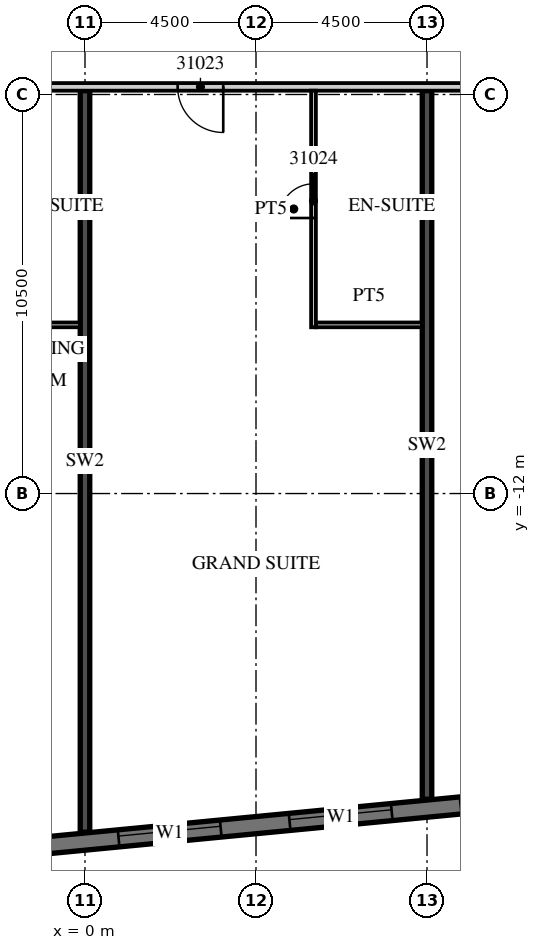
"""IFC4 building model, lengths in metres.
Left out: names, types, materials, properties, quantities, classifications, styles, units other than length and angle.
Written with IfcOpenShell. Run it as: python <this file> out.ifc"""

import sys

from ifc_helpers import new_model, si_unit, direction, frame, frame_2d, origin, place, context, subcontext, project, spatial, rectangle, extrude, element, fill, save


model = new_model("IFC4")
c1 = context("Model", 3, precision=1e-05, world=origin(), true_north=direction((0.0, 1.0)))
c2 = subcontext(c1, "Body", "Model", "MODEL_VIEW")
j1 = project(units=[si_unit("LENGTHUNIT", "METRE"), si_unit("PLANEANGLEUNIT", "RADIAN")], contexts=[c1])
p1 = place(None, origin())
s1 = spatial("IfcSite", under=j1, at=p1, CompositionType="ELEMENT")
p2 = place(p1, origin())
s2 = spatial("IfcBuilding", under=s1, at=p2, CompositionType="ELEMENT")
p3 = place(p2, frame((0.0, 0.0, 137.2)))
s3 = spatial("IfcBuildingStorey", under=s2, at=p3, CompositionType="ELEMENT", Elevation=137.2)
p4 = place(p3, frame((0.0, -20.91, 0.0), z_axis=(0.0, 0.0, 1.0), x_axis=(0.0, 1.0, 0.0)))
e1 = element("IfcWall", 1, at=p4, inside=s3, PredefinedType="SHEAR", context=c2, shape_type="SweptSolid", body=[
    extrude(rectangle(XDim=19.51, YDim=0.25, at=frame_2d((9.755, 0.0))), origin(), (0.0, 0.0, 1.0), 3.3),
])
p5 = place(p3, frame((9.0, -20.044, 0.0), z_axis=(0.0, 0.0, 1.0), x_axis=(0.0, 1.0, 0.0)))
e2 = element("IfcWall", 2, at=p5, inside=s3, PredefinedType="SHEAR", context=c2, shape_type="SweptSolid", body=[
    extrude(rectangle(XDim=18.644, YDim=0.25, at=frame_2d((9.322, 0.0))), origin(), (0.0, 0.0, 1.0), 3.3),
])
p6 = place(p3, frame((-13.521, -22.46, 0.0), z_axis=(0.0, 0.0, 1.0), x_axis=(0.995396096335, 0.095846812164, 0.0)))
e3 = element("IfcWall", 3, at=p6, inside=s3, PredefinedType="SOLIDWALL", context=c2, shape_type="SweptSolid", body=[
    extrude(rectangle(XDim=59.151, YDim=0.45, at=frame_2d((29.575, 0.0))), origin(), (0.0, 0.0, 1.0), 3.02),
])
p7 = place(p6, frame((0.91, 0.0, 0.45)))
e4 = element("IfcOpeningElement", 4, at=p7, cuts=e3, PredefinedType="OPENING", context=c2, shape_type="SweptSolid", body=[
    extrude(rectangle(XDim=2.7, YDim=2.25, at=frame_2d((1.35, 1.125))), frame((0.0, 0.235, 0.0), z_axis=(0.0, -1.0, 0.0), x_axis=(1.0, 0.0, 0.0)), (0.0, 0.0, 1.0), 0.47),
])
p8 = place(p6, frame((5.431, 0.0, 0.45)))
e5 = element("IfcOpeningElement", 5, at=p8, cuts=e3, PredefinedType="OPENING", context=c2, shape_type="SweptSolid", body=[
    extrude(rectangle(XDim=2.7, YDim=2.25, at=frame_2d((1.35, 1.125))), frame((0.0, 0.235, 0.0), z_axis=(0.0, -1.0, 0.0), x_axis=(1.0, 0.0, 0.0)), (0.0, 0.0, 1.0), 0.47),
])
p9 = place(p6, frame((9.952, 0.0, 0.45)))
e6 = element("IfcOpeningElement", 6, at=p9, cuts=e3, PredefinedType="OPENING", context=c2, shape_type="SweptSolid", body=[
    extrude(rectangle(XDim=2.7, YDim=2.25, at=frame_2d((1.35, 1.125))), frame((0.0, 0.235, 0.0), z_axis=(0.0, -1.0, 0.0), x_axis=(1.0, 0.0, 0.0)), (0.0, 0.0, 1.0), 0.47),
])
p10 = place(p6, frame((14.473, 0.0, 0.45)))
e7 = element("IfcOpeningElement", 7, at=p10, cuts=e3, PredefinedType="OPENING", context=c2, shape_type="SweptSolid", body=[
    extrude(rectangle(XDim=2.7, YDim=2.25, at=frame_2d((1.35, 1.125))), frame((0.0, 0.235, 0.0), z_axis=(0.0, -1.0, 0.0), x_axis=(1.0, 0.0, 0.0)), (0.0, 0.0, 1.0), 0.47),
])
p11 = place(p6, frame((18.994, 0.0, 0.45)))
e8 = element("IfcOpeningElement", 8, at=p11, cuts=e3, PredefinedType="OPENING", context=c2, shape_type="SweptSolid", body=[
    extrude(rectangle(XDim=2.7, YDim=2.25, at=frame_2d((1.35, 1.125))), frame((0.0, 0.235, 0.0), z_axis=(0.0, -1.0, 0.0), x_axis=(1.0, 0.0, 0.0)), (0.0, 0.0, 1.0), 0.47),
])
p12 = place(p6, frame((23.514, 0.0, 0.45)))
e9 = element("IfcOpeningElement", 9, at=p12, cuts=e3, PredefinedType="OPENING", context=c2, shape_type="SweptSolid", body=[
    extrude(rectangle(XDim=2.7, YDim=2.25, at=frame_2d((1.35, 1.125))), frame((0.0, 0.235, 0.0), z_axis=(0.0, -1.0, 0.0), x_axis=(1.0, 0.0, 0.0)), (0.0, 0.0, 1.0), 0.47),
])
p13 = place(p6, frame((28.035, 0.0, 0.45)))
e10 = element("IfcOpeningElement", 10, at=p13, cuts=e3, PredefinedType="OPENING", context=c2, shape_type="SweptSolid", body=[
    extrude(rectangle(XDim=2.7, YDim=2.25, at=frame_2d((1.35, 1.125))), frame((0.0, 0.235, 0.0), z_axis=(0.0, -1.0, 0.0), x_axis=(1.0, 0.0, 0.0)), (0.0, 0.0, 1.0), 0.47),
])
p14 = place(p6, frame((32.556, 0.0, 0.45)))
e11 = element("IfcOpeningElement", 11, at=p14, cuts=e3, PredefinedType="OPENING", context=c2, shape_type="SweptSolid", body=[
    extrude(rectangle(XDim=2.7, YDim=2.25, at=frame_2d((1.35, 1.125))), frame((0.0, 0.235, 0.0), z_axis=(0.0, -1.0, 0.0), x_axis=(1.0, 0.0, 0.0)), (0.0, 0.0, 1.0), 0.47),
])
p15 = place(p6, frame((37.077, 0.0, 0.45)))
e12 = element("IfcOpeningElement", 12, at=p15, cuts=e3, PredefinedType="OPENING", context=c2, shape_type="SweptSolid", body=[
    extrude(rectangle(XDim=2.7, YDim=2.25, at=frame_2d((1.35, 1.125))), frame((0.0, 0.235, 0.0), z_axis=(0.0, -1.0, 0.0), x_axis=(1.0, 0.0, 0.0)), (0.0, 0.0, 1.0), 0.47),
])
p16 = place(p6, frame((41.598, 0.0, 0.45)))
e13 = element("IfcOpeningElement", 13, at=p16, cuts=e3, PredefinedType="OPENING", context=c2, shape_type="SweptSolid", body=[
    extrude(rectangle(XDim=2.7, YDim=2.25, at=frame_2d((1.35, 1.125))), frame((0.0, 0.235, 0.0), z_axis=(0.0, -1.0, 0.0), x_axis=(1.0, 0.0, 0.0)), (0.0, 0.0, 1.0), 0.47),
])
p17 = place(p6, frame((46.118, 0.0, 0.45)))
e14 = element("IfcOpeningElement", 14, at=p17, cuts=e3, PredefinedType="OPENING", context=c2, shape_type="SweptSolid", body=[
    extrude(rectangle(XDim=2.7, YDim=2.25, at=frame_2d((1.35, 1.125))), frame((0.0, 0.235, 0.0), z_axis=(0.0, -1.0, 0.0), x_axis=(1.0, 0.0, 0.0)), (0.0, 0.0, 1.0), 0.47),
])
p18 = place(p6, frame((50.639, 0.0, 0.45)))
e15 = element("IfcOpeningElement", 15, at=p18, cuts=e3, PredefinedType="OPENING", context=c2, shape_type="SweptSolid", body=[
    extrude(rectangle(XDim=2.7, YDim=2.25, at=frame_2d((1.35, 1.125))), frame((0.0, 0.235, 0.0), z_axis=(0.0, -1.0, 0.0), x_axis=(1.0, 0.0, 0.0)), (0.0, 0.0, 1.0), 0.47),
])
p19 = place(p6, frame((55.15, 0.0, 0.45)))
e16 = element("IfcOpeningElement", 16, at=p19, cuts=e3, PredefinedType="OPENING", context=c2, shape_type="SweptSolid", body=[
    extrude(rectangle(XDim=2.7, YDim=2.25, at=frame_2d((1.35, 1.125))), frame((0.0, 0.235, 0.0), z_axis=(0.0, -1.0, 0.0), x_axis=(1.0, 0.0, 0.0)), (0.0, 0.0, 1.0), 0.47),
])
p20 = place(p3, frame((-13.5, -1.3, 0.0), z_axis=(0.0, 0.0, 1.0), x_axis=(1.0, 0.0, 0.0)))
e17 = element("IfcWall", 17, at=p20, inside=s3, PredefinedType="PARTITIONING", context=c2, shape_type="SweptSolid", body=[
    extrude(rectangle(XDim=60.932, YDim=0.2, at=frame_2d((30.466, 0.0))), origin(), (0.0, 0.0, 1.0), 3.02),
])
p21 = place(p20, frame((2.925, 0.0, 0.0)))
e18 = element("IfcOpeningElement", 18, at=p21, cuts=e17, PredefinedType="OPENING", context=c2, shape_type="SweptSolid", body=[
    extrude(rectangle(XDim=1.0, YDim=2.1, at=frame_2d((0.5, 1.05))), frame((0.0, 0.11, 0.0), z_axis=(0.0, -1.0, 0.0), x_axis=(1.0, 0.0, 0.0)), (0.0, 0.0, 1.0), 0.22),
])
p22 = place(p20, frame((7.45, 0.0, 0.0)))
e19 = element("IfcOpeningElement", 19, at=p22, cuts=e17, PredefinedType="OPENING", context=c2, shape_type="SweptSolid", body=[
    extrude(rectangle(XDim=1.0, YDim=2.1, at=frame_2d((0.5, 1.05))), frame((0.0, 0.11, 0.0), z_axis=(0.0, -1.0, 0.0), x_axis=(1.0, 0.0, 0.0)), (0.0, 0.0, 1.0), 0.22),
])
p23 = place(p20, frame((9.55, 0.0, 0.0)))
e20 = element("IfcOpeningElement", 20, at=p23, cuts=e17, PredefinedType="OPENING", context=c2, shape_type="SweptSolid", body=[
    extrude(rectangle(XDim=1.0, YDim=2.1, at=frame_2d((0.5, 1.05))), frame((0.0, 0.11, 0.0), z_axis=(0.0, -1.0, 0.0), x_axis=(1.0, 0.0, 0.0)), (0.0, 0.0, 1.0), 0.22),
])
p24 = place(p20, frame((15.938, 0.0, 0.0)))
e21 = element("IfcOpeningElement", 21, at=p24, cuts=e17, PredefinedType="OPENING", context=c2, shape_type="SweptSolid", body=[
    extrude(rectangle(XDim=1.2, YDim=2.1, at=frame_2d((0.6, 1.05))), frame((0.0, 0.11, 0.0), z_axis=(0.0, -1.0, 0.0), x_axis=(1.0, 0.0, 0.0)), (0.0, 0.0, 1.0), 0.22),
])
p25 = place(p20, frame((24.938, 0.0, 0.0)))
e22 = element("IfcOpeningElement", 22, at=p25, cuts=e17, PredefinedType="OPENING", context=c2, shape_type="SweptSolid", body=[
    extrude(rectangle(XDim=1.2, YDim=2.1, at=frame_2d((0.6, 1.05))), frame((0.0, 0.11, 0.0), z_axis=(0.0, -1.0, 0.0), x_axis=(1.0, 0.0, 0.0)), (0.0, 0.0, 1.0), 0.22),
])
p26 = place(p20, frame((32.075, 0.0, 0.0)))
e23 = element("IfcOpeningElement", 23, at=p26, cuts=e17, PredefinedType="OPENING", context=c2, shape_type="SweptSolid", body=[
    extrude(rectangle(XDim=1.0, YDim=2.1, at=frame_2d((0.5, 1.05))), frame((0.0, 0.11, 0.0), z_axis=(0.0, -1.0, 0.0), x_axis=(1.0, 0.0, 0.0)), (0.0, 0.0, 1.0), 0.22),
])
p27 = place(p20, frame((36.55, 0.0, 0.0)))
e24 = element("IfcOpeningElement", 24, at=p27, cuts=e17, PredefinedType="OPENING", context=c2, shape_type="SweptSolid", body=[
    extrude(rectangle(XDim=1.0, YDim=2.1, at=frame_2d((0.5, 1.05))), frame((0.0, 0.11, 0.0), z_axis=(0.0, -1.0, 0.0), x_axis=(1.0, 0.0, 0.0)), (0.0, 0.0, 1.0), 0.22),
])
p28 = place(p20, frame((45.862, 0.0, 0.0)))
e25 = element("IfcOpeningElement", 25, at=p28, cuts=e17, PredefinedType="OPENING", context=c2, shape_type="SweptSolid", body=[
    extrude(rectangle(XDim=1.2, YDim=2.1, at=frame_2d((0.6, 1.05))), frame((0.0, 0.11, 0.0), z_axis=(0.0, -1.0, 0.0), x_axis=(1.0, 0.0, 0.0)), (0.0, 0.0, 1.0), 0.22),
])
p29 = place(p20, frame((50.075, 0.0, 0.0)))
e26 = element("IfcOpeningElement", 26, at=p29, cuts=e17, PredefinedType="OPENING", context=c2, shape_type="SweptSolid", body=[
    extrude(rectangle(XDim=1.0, YDim=2.1, at=frame_2d((0.5, 1.05))), frame((0.0, 0.11, 0.0), z_axis=(0.0, -1.0, 0.0), x_axis=(1.0, 0.0, 0.0)), (0.0, 0.0, 1.0), 0.22),
])
p30 = place(p20, frame((56.95, 0.0, 0.0)))
e27 = element("IfcOpeningElement", 27, at=p30, cuts=e17, PredefinedType="OPENING", context=c2, shape_type="SweptSolid", body=[
    extrude(rectangle(XDim=1.0, YDim=2.1, at=frame_2d((0.5, 1.05))), frame((0.0, 0.11, 0.0), z_axis=(0.0, -1.0, 0.0), x_axis=(1.0, 0.0, 0.0)), (0.0, 0.0, 1.0), 0.22),
])
p31 = place(p20, frame((59.882, 0.0, 0.0)))
e28 = element("IfcOpeningElement", 28, at=p31, cuts=e17, PredefinedType="OPENING", context=c2, shape_type="SweptSolid", body=[
    extrude(rectangle(XDim=0.9, YDim=2.1, at=frame_2d((0.45, 1.05))), frame((0.0, 0.11, 0.0), z_axis=(0.0, -1.0, 0.0), x_axis=(1.0, 0.0, 0.0)), (0.0, 0.0, 1.0), 0.22),
])
p32 = place(p3, frame((-2.375, -7.562, 0.0), z_axis=(0.0, 0.0, 1.0), x_axis=(1.0, 0.0, 0.0)))
e29 = element("IfcWall", 29, at=p32, inside=s3, PredefinedType="PARTITIONING", context=c2, shape_type="SweptSolid", body=[
    extrude(rectangle(XDim=2.25, YDim=0.125, at=frame_2d((1.125, 0.0))), origin(), (0.0, 0.0, 1.0), 3.02),
])
p33 = place(p3, frame((6.013, -7.625, 0.0), z_axis=(0.0, 0.0, 1.0), x_axis=(0.0, 1.0, 0.0)))
e30 = element("IfcWall", 30, at=p33, inside=s3, PredefinedType="PARTITIONING", context=c2, shape_type="SweptSolid", body=[
    extrude(rectangle(XDim=6.225, YDim=0.125, at=frame_2d((3.113, 0.0))), origin(), (0.0, 0.0, 1.0), 3.02),
])
p34 = place(p33, frame((2.875, 0.0, 0.0)))
e31 = element("IfcOpeningElement", 31, at=p34, cuts=e30, PredefinedType="OPENING", context=c2, shape_type="SweptSolid", body=[
    extrude(rectangle(XDim=0.9, YDim=2.1, at=frame_2d((0.45, 1.05))), frame((0.0, 0.073, 0.0), z_axis=(0.0, -1.0, 0.0), x_axis=(1.0, 0.0, 0.0)), (0.0, 0.0, 1.0), 0.145),
])
p35 = place(p3, frame((6.075, -7.562, 0.0), z_axis=(0.0, 0.0, 1.0), x_axis=(1.0, 0.0, 0.0)))
e32 = element("IfcWall", 32, at=p35, inside=s3, PredefinedType="PARTITIONING", context=c2, shape_type="SweptSolid", body=[
    extrude(rectangle(XDim=2.8, YDim=0.125, at=frame_2d((1.4, 0.0))), origin(), (0.0, 0.0, 1.0), 3.02),
])
p36 = place(p10, origin())
e33 = element("IfcWindow", 33, at=p36, inside=s3, PartitioningType="SINGLE_PANEL", PredefinedType="WINDOW", context=c2, shape_type="SweptSolid", body=[
    extrude(rectangle(XDim=2.7, YDim=2.25, at=frame_2d((1.35, 1.125))), frame((0.0, 0.09, 0.0), z_axis=(0.0, -1.0, 0.0), x_axis=(1.0, 0.0, 0.0)), (0.0, 0.0, 1.0), 0.06),
])
fill(e7, e33)
p37 = place(p11, origin())
e34 = element("IfcWindow", 34, at=p37, inside=s3, PartitioningType="SINGLE_PANEL", PredefinedType="WINDOW", context=c2, shape_type="SweptSolid", body=[
    extrude(rectangle(XDim=2.7, YDim=2.25, at=frame_2d((1.35, 1.125))), frame((0.0, 0.09, 0.0), z_axis=(0.0, -1.0, 0.0), x_axis=(1.0, 0.0, 0.0)), (0.0, 0.0, 1.0), 0.06),
])
fill(e8, e34)
p38 = place(p24, origin())
e35 = element("IfcDoor", 35, at=p38, inside=s3, OperationType="SINGLE_SWING_RIGHT", PredefinedType="DOOR", context=c2, shape_type="SweptSolid", body=[
    extrude(rectangle(XDim=1.2, YDim=2.1, at=frame_2d((0.6, 1.05))), frame((0.0, 0.025, 0.0), z_axis=(0.0, -1.0, 0.0), x_axis=(1.0, 0.0, 0.0)), (0.0, 0.0, 1.0), 0.05),
])
fill(e21, e35)
p39 = place(p34, origin())
e36 = element("IfcDoor", 36, at=p39, inside=s3, OperationType="SINGLE_SWING_LEFT", PredefinedType="DOOR", context=c2, shape_type="SweptSolid", body=[
    extrude(rectangle(XDim=0.9, YDim=2.1, at=frame_2d((0.45, 1.05))), frame((0.0, 0.025, 0.0), z_axis=(0.0, -1.0, 0.0), x_axis=(1.0, 0.0, 0.0)), (0.0, 0.0, 1.0), 0.05),
])
fill(e31, e36)
save(model, sys.argv[1])
